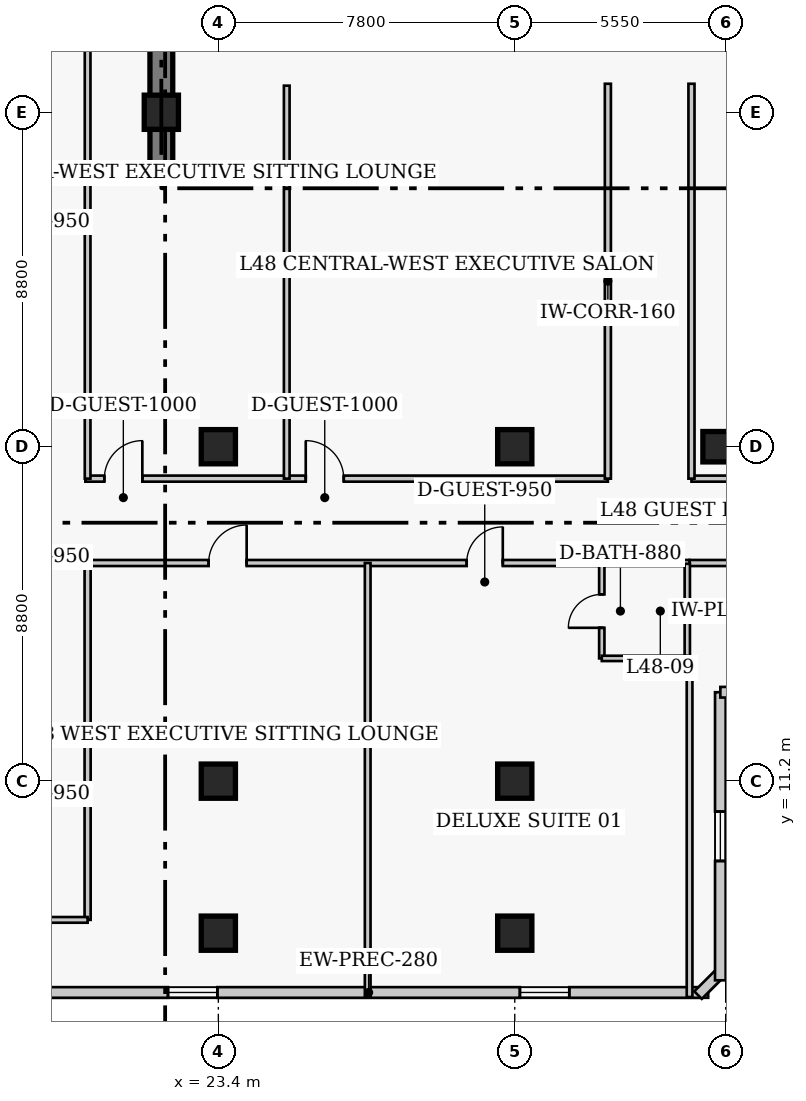
"""IFC4 building model, lengths in metres.
Left out: names, types, materials, properties, quantities, classifications, styles, units other than length and angle.
Written with IfcOpenShell. Run it as: python <this file> out.ifc"""

import sys

from ifc_helpers import new_model, si_unit, direction, frame, frame_2d, origin, origin_2d, place, context, subcontext, project, spatial, rectangle, extrude, element, fill, save


model = new_model("IFC4")
c1 = context("Model", 3, precision=1e-05, world=origin(), true_north=direction((0.0, 1.0)))
c2 = subcontext(c1, "Body", "Model", "MODEL_VIEW")
j1 = project(units=[si_unit("LENGTHUNIT", "METRE"), si_unit("PLANEANGLEUNIT", "RADIAN")], contexts=[c1])
p1 = place(None, origin())
s1 = spatial("IfcSite", under=j1, at=p1, CompositionType="ELEMENT")
p2 = place(p1, origin())
s2 = spatial("IfcBuilding", under=s1, at=p2, CompositionType="ELEMENT")
p3 = place(p2, frame((0.0, 0.0, 192.9)))
s3 = spatial("IfcBuildingStorey", under=s2, at=p3, CompositionType="ELEMENT", Elevation=192.9)
p4 = place(p3, frame((21.9, 27.05, 0.0), z_axis=(0.0, 0.0, 1.0), x_axis=(0.0, 1.0, 0.0)))
e1 = element("IfcWall", 1, at=p4, inside=s3, PredefinedType="SHEAR", context=c2, shape_type="SweptSolid", body=[
    extrude(rectangle(XDim=13.57, YDim=0.6, at=frame_2d((6.785, 0.0))), origin(), (0.0, 0.0, 1.0), 3.9),
])
for number, where, z_axis, x_axis in (
    (2, (23.4, 11.2, 0.0), (0.0, 0.0, 1.0), (1.0, 0.0, 0.0)),
    (3, (23.4, 20.0, 0.0), (0.0, 0.0, 1.0), (1.0, 0.0, 0.0)),
    (4, (31.2, 11.2, 0.0), (0.0, 0.0, 1.0), (1.0, 0.0, 0.0)),
    (5, (31.2, 20.0, 0.0), (0.0, 0.0, 1.0), (1.0, 0.0, 0.0)),
):
    element("IfcColumn", number, at=place(p3, frame(where, z_axis=z_axis, x_axis=x_axis)), inside=s3, PredefinedType="COLUMN", context=c2, shape_type="SweptSolid", body=[
        extrude(rectangle(XDim=0.9, YDim=0.9, at=origin_2d()), origin(), (0.0, 0.0, 1.0), 3.9),
    ])
p5 = place(p3, frame((36.75, 20.0, 0.0), z_axis=(0.0, 0.0, 1.0), x_axis=(1.0, 0.0, 0.0)))
e6 = element("IfcColumn", 6, at=p5, inside=s3, PredefinedType="COLUMN", context=c2, shape_type="SweptSolid", body=[
    extrude(rectangle(XDim=1.2, YDim=0.8, at=origin_2d()), origin(), (0.0, 0.0, 1.0), 3.9),
])
for number, where, z_axis, x_axis in (
    (7, (21.9, 28.8, 0.0), (0.0, 0.0, 1.0), (1.0, 0.0, 0.0)),
    (8, (23.4, 7.2, 0.0), (0.0, 0.0, 1.0), (1.0, 0.0, 0.0)),
    (9, (31.2, 7.2, 0.0), (0.0, 0.0, 1.0), (1.0, 0.0, 0.0)),
):
    element("IfcColumn", number, at=place(p3, frame(where, z_axis=z_axis, x_axis=x_axis)), inside=s3, PredefinedType="COLUMN", context=c2, shape_type="SweptSolid", body=[
        extrude(rectangle(XDim=0.9, YDim=0.9, at=origin_2d()), origin(), (0.0, 0.0, 1.0), 3.9),
    ])
p6 = place(p3, frame((10.46, 5.64, 0.0), z_axis=(0.0, 0.0, 1.0), x_axis=(1.0, 0.0, 0.0)))
e10 = element("IfcWall", 10, at=p6, inside=s3, PredefinedType="SOLIDWALL", context=c2, shape_type="SweptSolid", body=[
    extrude(rectangle(XDim=25.83, YDim=0.28, at=frame_2d((12.915, 0.0))), origin(), (0.0, 0.0, 1.0), 3.65),
])
p7 = place(p6, frame((4.305, 0.0, 0.85)))
e11 = element("IfcOpeningElement", 11, at=p7, cuts=e10, PredefinedType="OPENING", context=c2, shape_type="SweptSolid", body=[
    extrude(rectangle(XDim=1.3, YDim=1.7, at=frame_2d((0.65, 0.85))), frame((0.0, 0.15, 0.0), z_axis=(0.0, -1.0, 0.0), x_axis=(1.0, 0.0, 0.0)), (0.0, 0.0, 1.0), 0.3),
])
p8 = place(p6, frame((11.615, 0.0, 0.85)))
e12 = element("IfcOpeningElement", 12, at=p8, cuts=e10, PredefinedType="OPENING", context=c2, shape_type="SweptSolid", body=[
    extrude(rectangle(XDim=1.3, YDim=1.7, at=frame_2d((0.65, 0.85))), frame((0.0, 0.15, 0.0), z_axis=(0.0, -1.0, 0.0), x_axis=(1.0, 0.0, 0.0)), (0.0, 0.0, 1.0), 0.3),
])
p9 = place(p6, frame((20.875, 0.0, 0.85)))
e13 = element("IfcOpeningElement", 13, at=p9, cuts=e10, PredefinedType="OPENING", context=c2, shape_type="SweptSolid", body=[
    extrude(rectangle(XDim=1.3, YDim=1.7, at=frame_2d((0.65, 0.85))), frame((0.0, 0.15, 0.0), z_axis=(0.0, -1.0, 0.0), x_axis=(1.0, 0.0, 0.0)), (0.0, 0.0, 1.0), 0.3),
])
p10 = place(p3, frame((36.023, 5.571, 0.0), z_axis=(0.0, 0.0, 1.0), x_axis=(0.707106781187, 0.707106781187, 0.0)))
e14 = element("IfcWall", 14, at=p10, inside=s3, PredefinedType="SOLIDWALL", context=c2, shape_type="SweptSolid", body=[
    extrude(rectangle(XDim=0.928, YDim=0.28, at=frame_2d((0.464, 0.0))), origin(), (0.0, 0.0, 1.0), 3.65),
])
p11 = place(p3, frame((36.61, 5.96, 0.0), z_axis=(0.0, 0.0, 1.0), x_axis=(0.0, 1.0, 0.0)))
e15 = element("IfcWall", 15, at=p11, inside=s3, PredefinedType="SOLIDWALL", context=c2, shape_type="SweptSolid", body=[
    extrude(rectangle(XDim=7.58, YDim=0.28, at=frame_2d((3.79, 0.0))), origin(), (0.0, 0.0, 1.0), 3.65),
])
p12 = place(p11, frame((3.14, 0.0, 0.85)))
e16 = element("IfcOpeningElement", 16, at=p12, cuts=e15, PredefinedType="OPENING", context=c2, shape_type="SweptSolid", body=[
    extrude(rectangle(XDim=1.3, YDim=1.7, at=frame_2d((0.65, 0.85))), frame((0.0, 0.15, 0.0), z_axis=(0.0, -1.0, 0.0), x_axis=(1.0, 0.0, 0.0)), (0.0, 0.0, 1.0), 0.3),
])
p13 = place(p3, frame((36.61, 13.54, 0.0), z_axis=(0.0, 0.0, 1.0), x_axis=(1.0, 0.0, 0.0)))
e17 = element("IfcWall", 17, at=p13, inside=s3, PredefinedType="SOLIDWALL", context=c2, shape_type="SweptSolid", body=[
    extrude(rectangle(XDim=4.78, YDim=0.28, at=frame_2d((2.39, 0.0))), origin(), (0.0, 0.0, 1.0), 3.65),
])
p14 = place(p13, frame((1.74, 0.0, 0.85)))
e18 = element("IfcOpeningElement", 18, at=p14, cuts=e17, PredefinedType="OPENING", context=c2, shape_type="SweptSolid", body=[
    extrude(rectangle(XDim=1.3, YDim=1.7, at=frame_2d((0.65, 0.85))), frame((0.0, 0.15, 0.0), z_axis=(0.0, -1.0, 0.0), x_axis=(1.0, 0.0, 0.0)), (0.0, 0.0, 1.0), 0.3),
])
p15 = place(p3, frame((19.9, 19.16, 0.0), z_axis=(0.0, 0.0, 1.0), x_axis=(1.0, 0.0, 0.0)))
e19 = element("IfcWall", 19, at=p15, inside=s3, PredefinedType="PARTITIONING", context=c2, shape_type="SweptSolid", body=[
    extrude(rectangle(XDim=13.75, YDim=0.16, at=frame_2d((6.875, 0.0))), origin(), (0.0, 0.0, 1.0), 3.65),
])
p16 = place(p15, frame((0.5, 0.0, 0.0)))
e20 = element("IfcOpeningElement", 20, at=p16, cuts=e19, PredefinedType="OPENING", context=c2, shape_type="SweptSolid", body=[
    extrude(rectangle(XDim=1.0, YDim=2.15, at=frame_2d((0.5, 1.075))), frame((0.0, 0.09, 0.0), z_axis=(0.0, -1.0, 0.0), x_axis=(1.0, 0.0, 0.0)), (0.0, 0.0, 1.0), 0.18),
])
p17 = place(p15, frame((5.8, 0.0, 0.0)))
e21 = element("IfcOpeningElement", 21, at=p17, cuts=e19, PredefinedType="OPENING", context=c2, shape_type="SweptSolid", body=[
    extrude(rectangle(XDim=1.0, YDim=2.15, at=frame_2d((0.5, 1.075))), frame((0.0, 0.09, 0.0), z_axis=(0.0, -1.0, 0.0), x_axis=(1.0, 0.0, 0.0)), (0.0, 0.0, 1.0), 0.18),
])
p18 = place(p3, frame((35.85, 19.16, 0.0), z_axis=(0.0, 0.0, 1.0), x_axis=(1.0, 0.0, 0.0)))
e22 = element("IfcWall", 22, at=p18, inside=s3, PredefinedType="PARTITIONING", context=c2, shape_type="SweptSolid", body=[
    extrude(rectangle(XDim=23.0, YDim=0.16, at=frame_2d((11.5, 0.0))), origin(), (0.0, 0.0, 1.0), 3.65),
])
p19 = place(p18, frame((7.231, 0.0, 0.0)))
e23 = element("IfcOpeningElement", 23, at=p19, cuts=e22, PredefinedType="OPENING", context=c2, shape_type="SweptSolid", body=[
    extrude(rectangle(XDim=1.0, YDim=2.15, at=frame_2d((0.5, 1.075))), frame((0.0, 0.09, 0.0), z_axis=(0.0, -1.0, 0.0), x_axis=(1.0, 0.0, 0.0)), (0.0, 0.0, 1.0), 0.18),
])
p20 = place(p18, frame((13.45, 0.0, 0.0)))
e24 = element("IfcOpeningElement", 24, at=p20, cuts=e22, PredefinedType="OPENING", context=c2, shape_type="SweptSolid", body=[
    extrude(rectangle(XDim=1.0, YDim=2.15, at=frame_2d((0.5, 1.075))), frame((0.0, 0.09, 0.0), z_axis=(0.0, -1.0, 0.0), x_axis=(1.0, 0.0, 0.0)), (0.0, 0.0, 1.0), 0.18),
])
for number, where, z_axis, x_axis in (
    (25, (33.65, 19.16, 0.0), (0.0, 0.0, 1.0), (0.0, 1.0, 0.0)),
    (26, (35.85, 19.16, 0.0), (0.0, 0.0, 1.0), (0.0, 1.0, 0.0)),
):
    element("IfcWall", number, at=place(p3, frame(where, z_axis=z_axis, x_axis=x_axis)), inside=s3, PredefinedType="PARTITIONING", context=c2, shape_type="SweptSolid", body=[
        extrude(rectangle(XDim=10.39, YDim=0.16, at=frame_2d((5.195, 0.0))), origin(), (0.0, 0.0, 1.0), 3.65),
    ])
p21 = place(p3, frame((19.9, 16.94, 0.0), z_axis=(0.0, 0.0, 1.0), x_axis=(1.0, 0.0, 0.0)))
e27 = element("IfcWall", 27, at=p21, inside=s3, PredefinedType="PARTITIONING", context=c2, shape_type="SweptSolid", body=[
    extrude(rectangle(XDim=15.9, YDim=0.16, at=frame_2d((7.95, 0.0))), origin(), (0.0, 0.0, 1.0), 3.65),
])
p22 = place(p21, frame((3.245, 0.0, 0.0)))
e28 = element("IfcOpeningElement", 28, at=p22, cuts=e27, PredefinedType="OPENING", context=c2, shape_type="SweptSolid", body=[
    extrude(rectangle(XDim=1.0, YDim=2.15, at=frame_2d((0.5, 1.075))), frame((0.0, 0.09, 0.0), z_axis=(0.0, -1.0, 0.0), x_axis=(1.0, 0.0, 0.0)), (0.0, 0.0, 1.0), 0.18),
])
p23 = place(p21, frame((10.035, 0.0, 0.0)))
e29 = element("IfcOpeningElement", 29, at=p23, cuts=e27, PredefinedType="OPENING", context=c2, shape_type="SweptSolid", body=[
    extrude(rectangle(XDim=0.95, YDim=2.1, at=frame_2d((0.475, 1.05))), frame((0.0, 0.09, 0.0), z_axis=(0.0, -1.0, 0.0), x_axis=(1.0, 0.0, 0.0)), (0.0, 0.0, 1.0), 0.18),
])
p24 = place(p3, frame((35.8, 16.94, 0.0), z_axis=(0.0, 0.0, 1.0), x_axis=(1.0, 0.0, 0.0)))
e30 = element("IfcWall", 30, at=p24, inside=s3, PredefinedType="PARTITIONING", context=c2, shape_type="SweptSolid", body=[
    extrude(rectangle(XDim=23.05, YDim=0.16, at=frame_2d((11.525, 0.0))), origin(), (0.0, 0.0, 1.0), 3.65),
])
p25 = place(p24, frame((7.222, 0.0, 0.0)))
e31 = element("IfcOpeningElement", 31, at=p25, cuts=e30, PredefinedType="OPENING", context=c2, shape_type="SweptSolid", body=[
    extrude(rectangle(XDim=1.0, YDim=2.15, at=frame_2d((0.5, 1.075))), frame((0.0, 0.09, 0.0), z_axis=(0.0, -1.0, 0.0), x_axis=(1.0, 0.0, 0.0)), (0.0, 0.0, 1.0), 0.18),
])
p26 = place(p24, frame((11.639, 0.0, 0.0)))
e32 = element("IfcOpeningElement", 32, at=p26, cuts=e30, PredefinedType="OPENING", context=c2, shape_type="SweptSolid", body=[
    extrude(rectangle(XDim=0.95, YDim=2.1, at=frame_2d((0.475, 1.05))), frame((0.0, 0.09, 0.0), z_axis=(0.0, -1.0, 0.0), x_axis=(1.0, 0.0, 0.0)), (0.0, 0.0, 1.0), 0.18),
])
p27 = place(p24, frame((17.936, 0.0, 0.0)))
e33 = element("IfcOpeningElement", 33, at=p27, cuts=e30, PredefinedType="OPENING", context=c2, shape_type="SweptSolid", body=[
    extrude(rectangle(XDim=0.95, YDim=2.1, at=frame_2d((0.475, 1.05))), frame((0.0, 0.09, 0.0), z_axis=(0.0, -1.0, 0.0), x_axis=(1.0, 0.0, 0.0)), (0.0, 0.0, 1.0), 0.18),
])
p28 = place(p3, frame((19.96, 7.55, 0.0), z_axis=(0.0, 0.0, 1.0), x_axis=(0.0, 1.0, 0.0)))
e34 = element("IfcWall", 34, at=p28, inside=s3, PredefinedType="PARTITIONING", context=c2, shape_type="SweptSolid", body=[
    extrude(rectangle(XDim=9.39, YDim=0.16, at=frame_2d((4.695, 0.0))), origin(), (0.0, 0.0, 1.0), 3.65),
])
p29 = place(p3, frame((17.74, 7.55, 0.0), z_axis=(0.0, 0.0, 1.0), x_axis=(1.0, 0.0, 0.0)))
e35 = element("IfcWall", 35, at=p29, inside=s3, PredefinedType="PARTITIONING", context=c2, shape_type="SweptSolid", body=[
    extrude(rectangle(XDim=2.22, YDim=0.15, at=frame_2d((1.11, 0.0))), origin(), (0.0, 0.0, 1.0), 3.65),
])
p30 = place(p3, frame((19.96, 19.16, 0.0), z_axis=(0.0, 0.0, 1.0), x_axis=(0.0, 1.0, 0.0)))
e36 = element("IfcWall", 36, at=p30, inside=s3, PredefinedType="PARTITIONING", context=c2, shape_type="SweptSolid", body=[
    extrude(rectangle(XDim=13.64, YDim=0.15, at=frame_2d((6.82, 0.0))), origin(), (0.0, 0.0, 1.0), 3.65),
])
p31 = place(p3, frame((25.2, 19.16, 0.0), z_axis=(0.0, 0.0, 1.0), x_axis=(0.0, 1.0, 0.0)))
e37 = element("IfcWall", 37, at=p31, inside=s3, PredefinedType="PARTITIONING", context=c2, shape_type="SweptSolid", body=[
    extrude(rectangle(XDim=10.34, YDim=0.15, at=frame_2d((5.17, 0.0))), origin(), (0.0, 0.0, 1.0), 3.65),
])
p32 = place(p3, frame((27.33, 5.52, 0.0), z_axis=(0.0, 0.0, 1.0), x_axis=(0.0, 1.0, 0.0)))
e38 = element("IfcWall", 38, at=p32, inside=s3, PredefinedType="PARTITIONING", context=c2, shape_type="SweptSolid", body=[
    extrude(rectangle(XDim=11.42, YDim=0.15, at=frame_2d((5.71, 0.0))), origin(), (0.0, 0.0, 1.0), 3.246),
])
p33 = place(p3, frame((33.49, 14.43, 0.0), z_axis=(0.0, 0.0, 1.0), x_axis=(0.0, 1.0, 0.0)))
e39 = element("IfcWall", 39, at=p33, inside=s3, PredefinedType="PLUMBINGWALL", context=c2, shape_type="SweptSolid", body=[
    extrude(rectangle(XDim=2.49, YDim=0.14, at=frame_2d((1.245, 0.0))), origin(), (0.0, 0.0, 1.0), 3.65),
])
p34 = place(p33, frame((0.805, 0.0, 0.0)))
e40 = element("IfcOpeningElement", 40, at=p34, cuts=e39, PredefinedType="OPENING", context=c2, shape_type="SweptSolid", body=[
    extrude(rectangle(XDim=0.88, YDim=2.05, at=frame_2d((0.44, 1.025))), frame((0.0, 0.08, 0.0), z_axis=(0.0, -1.0, 0.0), x_axis=(1.0, 0.0, 0.0)), (0.0, 0.0, 1.0), 0.16),
])
p35 = place(p3, frame((35.74, 14.43, 0.0), z_axis=(0.0, 0.0, 1.0), x_axis=(0.0, 1.0, 0.0)))
e41 = element("IfcWall", 41, at=p35, inside=s3, PredefinedType="PLUMBINGWALL", context=c2, shape_type="SweptSolid", body=[
    extrude(rectangle(XDim=2.49, YDim=0.14, at=frame_2d((1.245, 0.0))), origin(), (0.0, 0.0, 1.0), 3.65),
])
p36 = place(p3, frame((33.49, 14.43, 0.0), z_axis=(0.0, 0.0, 1.0), x_axis=(1.0, 0.0, 0.0)))
e42 = element("IfcWall", 42, at=p36, inside=s3, PredefinedType="PLUMBINGWALL", context=c2, shape_type="SweptSolid", body=[
    extrude(rectangle(XDim=2.25, YDim=0.14, at=frame_2d((1.125, 0.0))), origin(), (0.0, 0.0, 1.0), 3.65),
])
p37 = place(p3, frame((35.8, 5.52, 0.0), z_axis=(0.0, 0.0, 1.0), x_axis=(0.0, 1.0, 0.0)))
e43 = element("IfcWall", 43, at=p37, inside=s3, PredefinedType="PARTITIONING", context=c2, shape_type="SweptSolid", body=[
    extrude(rectangle(XDim=8.91, YDim=0.15, at=frame_2d((4.455, 0.0))), origin(), (0.0, 0.0, 1.0), 3.65),
])
p38 = place(p8, origin())
e44 = element("IfcWindow", 44, at=p38, inside=s3, PartitioningType="SINGLE_PANEL", PredefinedType="WINDOW", context=c2, shape_type="SweptSolid", body=[
    extrude(rectangle(XDim=1.3, YDim=1.7, at=frame_2d((0.65, 0.85))), frame((0.0, 0.03, 0.0), z_axis=(0.0, -1.0, 0.0), x_axis=(1.0, 0.0, 0.0)), (0.0, 0.0, 1.0), 0.06),
])
fill(e12, e44)
p39 = place(p9, origin())
e45 = element("IfcWindow", 45, at=p39, inside=s3, PartitioningType="SINGLE_PANEL", PredefinedType="WINDOW", context=c2, shape_type="SweptSolid", body=[
    extrude(rectangle(XDim=1.3, YDim=1.7, at=frame_2d((0.65, 0.85))), frame((0.0, 0.03, 0.0), z_axis=(0.0, -1.0, 0.0), x_axis=(1.0, 0.0, 0.0)), (0.0, 0.0, 1.0), 0.06),
])
fill(e13, e45)
p40 = place(p12, origin())
e46 = element("IfcWindow", 46, at=p40, inside=s3, PartitioningType="SINGLE_PANEL", PredefinedType="WINDOW", context=c2, shape_type="SweptSolid", body=[
    extrude(rectangle(XDim=1.3, YDim=1.7, at=frame_2d((0.65, 0.85))), frame((0.0, 0.03, 0.0), z_axis=(0.0, -1.0, 0.0), x_axis=(1.0, 0.0, 0.0)), (0.0, 0.0, 1.0), 0.06),
])
fill(e16, e46)
p41 = place(p16, origin())
e47 = element("IfcDoor", 47, at=p41, inside=s3, OperationType="SINGLE_SWING_RIGHT", PredefinedType="DOOR", context=c2, shape_type="SweptSolid", body=[
    extrude(rectangle(XDim=1.0, YDim=2.15, at=frame_2d((0.5, 1.075))), frame((0.0, 0.025, 0.0), z_axis=(0.0, -1.0, 0.0), x_axis=(1.0, 0.0, 0.0)), (0.0, 0.0, 1.0), 0.05),
])
fill(e20, e47)
p42 = place(p17, origin())
e48 = element("IfcDoor", 48, at=p42, inside=s3, OperationType="SINGLE_SWING_LEFT", PredefinedType="DOOR", context=c2, shape_type="SweptSolid", body=[
    extrude(rectangle(XDim=1.0, YDim=2.15, at=frame_2d((0.5, 1.075))), frame((0.0, 0.025, 0.0), z_axis=(0.0, -1.0, 0.0), x_axis=(1.0, 0.0, 0.0)), (0.0, 0.0, 1.0), 0.05),
])
fill(e21, e48)
p43 = place(p22, origin())
e49 = element("IfcDoor", 49, at=p43, inside=s3, OperationType="SINGLE_SWING_RIGHT", PredefinedType="DOOR", context=c2, shape_type="SweptSolid", body=[
    extrude(rectangle(XDim=1.0, YDim=2.15, at=frame_2d((0.5, 1.075))), frame((0.0, 0.025, 0.0), z_axis=(0.0, -1.0, 0.0), x_axis=(1.0, 0.0, 0.0)), (0.0, 0.0, 1.0), 0.05),
])
fill(e28, e49)
p44 = place(p34, origin())
e50 = element("IfcDoor", 50, at=p44, inside=s3, OperationType="SINGLE_SWING_LEFT", PredefinedType="DOOR", context=c2, shape_type="SweptSolid", body=[
    extrude(rectangle(XDim=0.88, YDim=2.05, at=frame_2d((0.44, 1.025))), frame((0.0, 0.025, 0.0), z_axis=(0.0, -1.0, 0.0), x_axis=(1.0, 0.0, 0.0)), (0.0, 0.0, 1.0), 0.05),
])
fill(e40, e50)
p45 = place(p23, origin())
e51 = element("IfcDoor", 51, at=p45, inside=s3, OperationType="SINGLE_SWING_RIGHT", PredefinedType="DOOR", context=c2, shape_type="SweptSolid", body=[
    extrude(rectangle(XDim=0.95, YDim=2.1, at=frame_2d((0.475, 1.05))), frame((0.0, 0.025, 0.0), z_axis=(0.0, -1.0, 0.0), x_axis=(1.0, 0.0, 0.0)), (0.0, 0.0, 1.0), 0.05),
])
fill(e29, e51)
save(model, sys.argv[1])
